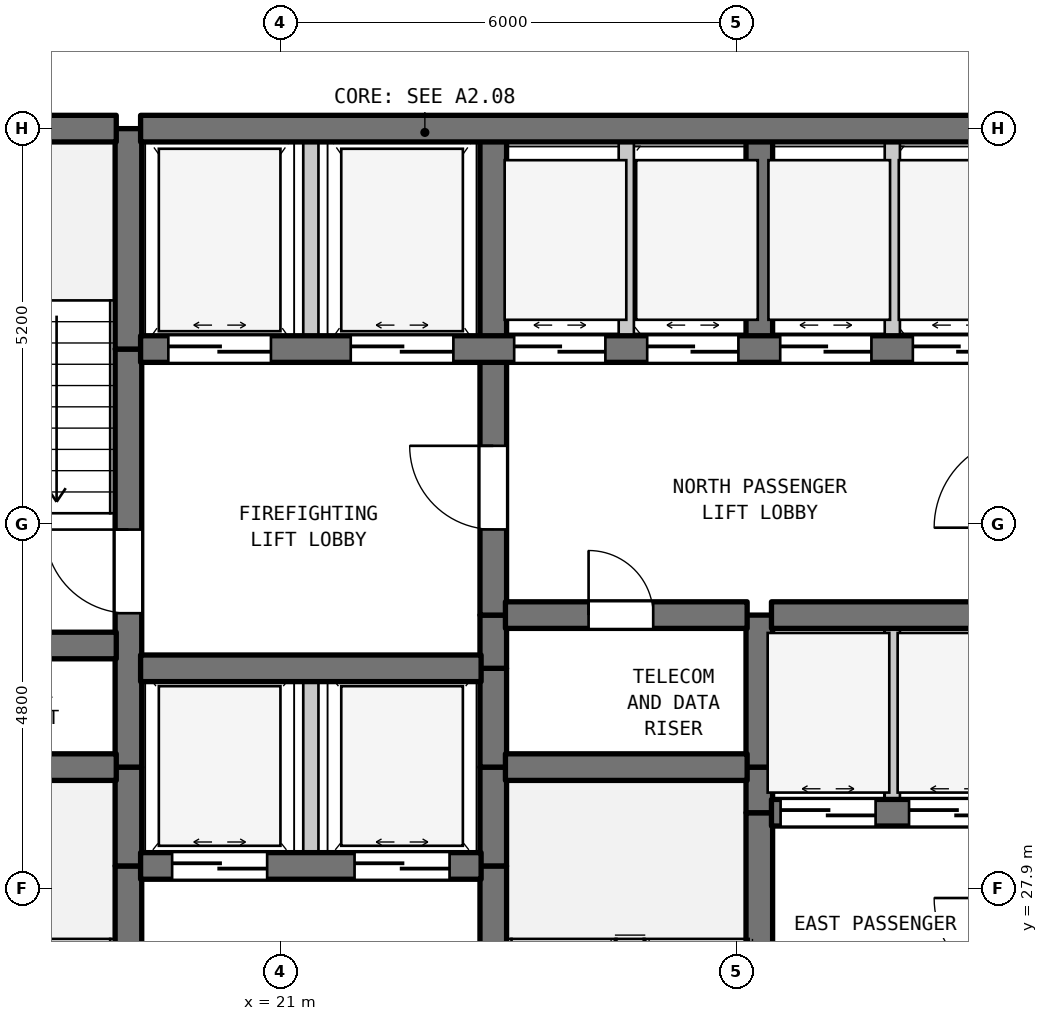
"""IFC4 building model, lengths in metres.
Left out: names, types, materials, properties, quantities, classifications, styles, units other than length and angle.
Written with IfcOpenShell. Run it as: python <this file> out.ifc"""

import sys

from ifc_helpers import new_model, si_unit, direction, frame, frame_2d, origin, place, context, subcontext, project, spatial, rectangle, extrude, element, fill, save


model = new_model("IFC4")
c1 = context("Model", 3, precision=1e-05, world=origin(), true_north=direction((0.0, 1.0)))
c2 = subcontext(c1, "Body", "Model", "MODEL_VIEW")
j1 = project(units=[si_unit("LENGTHUNIT", "METRE"), si_unit("PLANEANGLEUNIT", "RADIAN")], contexts=[c1])
p1 = place(None, origin())
s1 = spatial("IfcSite", under=j1, at=p1, CompositionType="ELEMENT")
p2 = place(p1, origin())
s2 = spatial("IfcBuilding", under=s1, at=p2, CompositionType="ELEMENT")
p3 = place(p2, frame((0.0, 0.0, 42.5)))
s3 = spatial("IfcBuildingStorey", under=s2, at=p3, CompositionType="ELEMENT", Elevation=42.5)
p4 = place(p3, frame((19.0, 22.7, 0.0), z_axis=(0.0, 0.0, 1.0), x_axis=(0.0, 1.0, 0.0)))
e1 = element("IfcWall", 1, at=p4, inside=s3, PredefinedType="SHEAR", context=c2, shape_type="SweptSolid", body=[
    extrude(rectangle(XDim=5.5, YDim=0.35, at=frame_2d((2.75, 0.0))), origin(), (0.0, 0.0, 1.0), 3.385),
])
p5 = place(p4, frame((0.631, 0.0, 0.0)))
e2 = element("IfcOpeningElement", 2, at=p5, cuts=e1, PredefinedType="OPENING", context=c2, shape_type="SweptSolid", body=[
    extrude(rectangle(XDim=1.1, YDim=2.15, at=frame_2d((0.55, 1.075))), frame((0.0, 0.185, 0.0), z_axis=(0.0, -1.0, 0.0), x_axis=(1.0, 0.0, 0.0)), (0.0, 0.0, 1.0), 0.37),
])
p6 = place(p3, frame((19.0, 28.2, 0.0), z_axis=(0.0, 0.0, 1.0), x_axis=(0.0, 1.0, 0.0)))
e3 = element("IfcWall", 3, at=p6, inside=s3, PredefinedType="SHEAR", context=c2, shape_type="SweptSolid", body=[
    extrude(rectangle(XDim=1.3, YDim=0.35, at=frame_2d((0.65, 0.0))), origin(), (0.0, 0.0, 1.0), 3.385),
])
p7 = place(p3, frame((19.0, 29.5, 0.0), z_axis=(0.0, 0.0, 1.0), x_axis=(0.0, 1.0, 0.0)))
e4 = element("IfcWall", 4, at=p7, inside=s3, PredefinedType="SHEAR", context=c2, shape_type="SweptSolid", body=[
    extrude(rectangle(XDim=5.5, YDim=0.35, at=frame_2d((2.75, 0.0))), origin(), (0.0, 0.0, 1.0), 3.385),
])
p8 = place(p7, frame((2.025, 0.0, 0.0)))
e5 = element("IfcOpeningElement", 5, at=p8, cuts=e4, PredefinedType="OPENING", context=c2, shape_type="SweptSolid", body=[
    extrude(rectangle(XDim=1.1, YDim=2.15, at=frame_2d((0.55, 1.075))), frame((0.0, 0.185, 0.0), z_axis=(0.0, -1.0, 0.0), x_axis=(1.0, 0.0, 0.0)), (0.0, 0.0, 1.0), 0.37),
])
p9 = place(p3, frame((19.0, 35.0, 0.0), z_axis=(0.0, 0.0, 1.0), x_axis=(0.0, 1.0, 0.0)))
e6 = element("IfcWall", 6, at=p9, inside=s3, PredefinedType="SHEAR", context=c2, shape_type="SweptSolid", body=[
    extrude(rectangle(XDim=2.9, YDim=0.35, at=frame_2d((1.45, 0.0))), origin(), (0.0, 0.0, 1.0), 3.385),
])
p10 = place(p3, frame((21.4, 28.2, 0.0), z_axis=(0.0, 0.0, 1.0), x_axis=(0.0, 1.0, 0.0)))
e7 = element("IfcWall", 7, at=p10, inside=s3, PredefinedType="STANDARD", context=c2, shape_type="SweptSolid", body=[
    extrude(rectangle(XDim=2.6, YDim=0.2, at=frame_2d((1.3, 0.0))), origin(), (0.0, 0.0, 1.0), 3.385),
])
p11 = place(p3, frame((21.4, 35.0, 0.0), z_axis=(0.0, 0.0, 1.0), x_axis=(0.0, 1.0, 0.0)))
e8 = element("IfcWall", 8, at=p11, inside=s3, PredefinedType="STANDARD", context=c2, shape_type="SweptSolid", body=[
    extrude(rectangle(XDim=2.9, YDim=0.2, at=frame_2d((1.45, 0.0))), origin(), (0.0, 0.0, 1.0), 3.385),
])
p12 = place(p3, frame((23.8, 22.7, 0.0), z_axis=(0.0, 0.0, 1.0), x_axis=(0.0, 1.0, 0.0)))
e9 = element("IfcWall", 9, at=p12, inside=s3, PredefinedType="SHEAR", context=c2, shape_type="SweptSolid", body=[
    extrude(rectangle(XDim=5.5, YDim=0.35, at=frame_2d((2.75, 0.0))), origin(), (0.0, 0.0, 1.0), 3.385),
])
p13 = place(p12, frame((0.235, 0.0, 0.0)))
e10 = element("IfcOpeningElement", 10, at=p13, cuts=e9, PredefinedType="OPENING", context=c2, shape_type="SweptSolid", body=[
    extrude(rectangle(XDim=1.1, YDim=2.15, at=frame_2d((0.55, 1.075))), frame((0.0, 0.185, 0.0), z_axis=(0.0, -1.0, 0.0), x_axis=(1.0, 0.0, 0.0)), (0.0, 0.0, 1.0), 0.37),
])
for number, where, z_axis, x_axis in (
    (11, (23.8, 28.2, 0.0), (0.0, 0.0, 1.0), (0.0, 1.0, 0.0)),
    (12, (23.8, 29.5, 0.0), (0.0, 0.0, 1.0), (0.0, 1.0, 0.0)),
):
    element("IfcWall", number, at=place(p3, frame(where, z_axis=z_axis, x_axis=x_axis)), inside=s3, PredefinedType="SHEAR", context=c2, shape_type="SweptSolid", body=[
        extrude(rectangle(XDim=1.3, YDim=0.35, at=frame_2d((0.65, 0.0))), origin(), (0.0, 0.0, 1.0), 3.385),
    ])
p14 = place(p3, frame((23.8, 30.8, 0.0), z_axis=(0.0, 0.0, 1.0), x_axis=(0.0, 1.0, 0.0)))
e13 = element("IfcWall", 13, at=p14, inside=s3, PredefinedType="SHEAR", context=c2, shape_type="SweptSolid", body=[
    extrude(rectangle(XDim=0.7, YDim=0.35, at=frame_2d((0.35, 0.0))), origin(), (0.0, 0.0, 1.0), 3.385),
])
p15 = place(p3, frame((23.8, 31.5, 0.0), z_axis=(0.0, 0.0, 1.0), x_axis=(0.0, 1.0, 0.0)))
e14 = element("IfcWall", 14, at=p15, inside=s3, PredefinedType="SHEAR", context=c2, shape_type="SweptSolid", body=[
    extrude(rectangle(XDim=3.5, YDim=0.35, at=frame_2d((1.75, 0.0))), origin(), (0.0, 0.0, 1.0), 3.385),
])
p16 = place(p15, frame((1.127, 0.0, 0.0)))
e15 = element("IfcOpeningElement", 15, at=p16, cuts=e14, PredefinedType="OPENING", context=c2, shape_type="SweptSolid", body=[
    extrude(rectangle(XDim=1.1, YDim=2.15, at=frame_2d((0.55, 1.075))), frame((0.0, 0.185, 0.0), z_axis=(0.0, -1.0, 0.0), x_axis=(1.0, 0.0, 0.0)), (0.0, 0.0, 1.0), 0.37),
])
p17 = place(p3, frame((23.8, 35.0, 0.0), z_axis=(0.0, 0.0, 1.0), x_axis=(0.0, 1.0, 0.0)))
e16 = element("IfcWall", 16, at=p17, inside=s3, PredefinedType="SHEAR", context=c2, shape_type="SweptSolid", body=[
    extrude(rectangle(XDim=2.9, YDim=0.35, at=frame_2d((1.45, 0.0))), origin(), (0.0, 0.0, 1.0), 3.385),
])
p18 = place(p3, frame((25.55, 35.0, 0.0), z_axis=(0.0, 0.0, 1.0), x_axis=(0.0, 1.0, 0.0)))
e17 = element("IfcWall", 17, at=p18, inside=s3, PredefinedType="STANDARD", context=c2, shape_type="SweptSolid", body=[
    extrude(rectangle(XDim=2.9, YDim=0.2, at=frame_2d((1.45, 0.0))), origin(), (0.0, 0.0, 1.0), 3.385),
])
p19 = place(p3, frame((27.3, 25.6, 0.0), z_axis=(0.0, 0.0, 1.0), x_axis=(0.0, 1.0, 0.0)))
e18 = element("IfcWall", 18, at=p19, inside=s3, PredefinedType="SHEAR", context=c2, shape_type="SweptSolid", body=[
    extrude(rectangle(XDim=3.3, YDim=0.35, at=frame_2d((1.65, 0.0))), origin(), (0.0, 0.0, 1.0), 3.385),
])
p20 = place(p3, frame((27.3, 28.9, 0.0), z_axis=(0.0, 0.0, 1.0), x_axis=(0.0, 1.0, 0.0)))
e19 = element("IfcWall", 19, at=p20, inside=s3, PredefinedType="SHEAR", context=c2, shape_type="SweptSolid", body=[
    extrude(rectangle(XDim=0.6, YDim=0.35, at=frame_2d((0.3, 0.0))), origin(), (0.0, 0.0, 1.0), 3.385),
])
p21 = place(p3, frame((27.3, 29.5, 0.0), z_axis=(0.0, 0.0, 1.0), x_axis=(0.0, 1.0, 0.0)))
e20 = element("IfcWall", 20, at=p21, inside=s3, PredefinedType="SHEAR", context=c2, shape_type="SweptSolid", body=[
    extrude(rectangle(XDim=2.0, YDim=0.35, at=frame_2d((1.0, 0.0))), origin(), (0.0, 0.0, 1.0), 3.385),
])
p22 = place(p3, frame((27.3, 35.0, 0.0), z_axis=(0.0, 0.0, 1.0), x_axis=(0.0, 1.0, 0.0)))
e21 = element("IfcWall", 21, at=p22, inside=s3, PredefinedType="SHEAR", context=c2, shape_type="SweptSolid", body=[
    extrude(rectangle(XDim=2.9, YDim=0.35, at=frame_2d((1.45, 0.0))), origin(), (0.0, 0.0, 1.0), 3.385),
])
p23 = place(p3, frame((29.05, 28.9, 0.0), z_axis=(0.0, 0.0, 1.0), x_axis=(0.0, 1.0, 0.0)))
e22 = element("IfcWall", 22, at=p23, inside=s3, PredefinedType="STANDARD", context=c2, shape_type="SweptSolid", body=[
    extrude(rectangle(XDim=2.6, YDim=0.2, at=frame_2d((1.3, 0.0))), origin(), (0.0, 0.0, 1.0), 3.385),
])
p24 = place(p3, frame((29.05, 35.0, 0.0), z_axis=(0.0, 0.0, 1.0), x_axis=(0.0, 1.0, 0.0)))
e23 = element("IfcWall", 23, at=p24, inside=s3, PredefinedType="STANDARD", context=c2, shape_type="SweptSolid", body=[
    extrude(rectangle(XDim=2.9, YDim=0.2, at=frame_2d((1.45, 0.0))), origin(), (0.0, 0.0, 1.0), 3.385),
])
p25 = place(p3, frame((19.16, 28.2, 0.0), z_axis=(0.0, 0.0, 1.0), x_axis=(1.0, 0.0, 0.0)))
e24 = element("IfcWall", 24, at=p25, inside=s3, PredefinedType="SHEAR", context=c2, shape_type="SweptSolid", body=[
    extrude(rectangle(XDim=4.48, YDim=0.35, at=frame_2d((2.24, 0.0))), origin(), (0.0, 0.0, 1.0), 3.385),
])
p26 = place(p25, frame((0.415, 0.0, 0.0)))
e25 = element("IfcOpeningElement", 25, at=p26, cuts=e24, PredefinedType="OPENING", context=c2, shape_type="SweptSolid", body=[
    extrude(rectangle(XDim=1.25, YDim=2.2, at=frame_2d((0.625, 1.1))), frame((0.0, 0.185, 0.0), z_axis=(0.0, -1.0, 0.0), x_axis=(1.0, 0.0, 0.0)), (0.0, 0.0, 1.0), 0.37),
])
p27 = place(p25, frame((2.815, 0.0, 0.0)))
e26 = element("IfcOpeningElement", 26, at=p27, cuts=e24, PredefinedType="OPENING", context=c2, shape_type="SweptSolid", body=[
    extrude(rectangle(XDim=1.25, YDim=2.2, at=frame_2d((0.625, 1.1))), frame((0.0, 0.185, 0.0), z_axis=(0.0, -1.0, 0.0), x_axis=(1.0, 0.0, 0.0)), (0.0, 0.0, 1.0), 0.37),
])
p28 = place(p3, frame((27.46, 28.9, 0.0), z_axis=(0.0, 0.0, 1.0), x_axis=(1.0, 0.0, 0.0)))
e27 = element("IfcWall", 27, at=p28, inside=s3, PredefinedType="SHEAR", context=c2, shape_type="SweptSolid", body=[
    extrude(rectangle(XDim=3.18, YDim=0.35, at=frame_2d((1.59, 0.0))), origin(), (0.0, 0.0, 1.0), 3.385),
])
p29 = place(p28, frame((0.12, 0.0, 0.0)))
e28 = element("IfcOpeningElement", 28, at=p29, cuts=e27, PredefinedType="OPENING", context=c2, shape_type="SweptSolid", body=[
    extrude(rectangle(XDim=1.25, YDim=2.2, at=frame_2d((0.625, 1.1))), frame((0.0, 0.185, 0.0), z_axis=(0.0, -1.0, 0.0), x_axis=(1.0, 0.0, 0.0)), (0.0, 0.0, 1.0), 0.37),
])
p30 = place(p28, frame((1.81, 0.0, 0.0)))
e29 = element("IfcOpeningElement", 29, at=p30, cuts=e27, PredefinedType="OPENING", context=c2, shape_type="SweptSolid", body=[
    extrude(rectangle(XDim=1.25, YDim=2.2, at=frame_2d((0.625, 1.1))), frame((0.0, 0.185, 0.0), z_axis=(0.0, -1.0, 0.0), x_axis=(1.0, 0.0, 0.0)), (0.0, 0.0, 1.0), 0.37),
])
p31 = place(p3, frame((15.16, 29.5, 0.0), z_axis=(0.0, 0.0, 1.0), x_axis=(1.0, 0.0, 0.0)))
e30 = element("IfcWall", 30, at=p31, inside=s3, PredefinedType="SHEAR", context=c2, shape_type="SweptSolid", body=[
    extrude(rectangle(XDim=3.68, YDim=0.35, at=frame_2d((1.84, 0.0))), origin(), (0.0, 0.0, 1.0), 3.385),
])
p32 = place(p3, frame((23.96, 29.5, 0.0), z_axis=(0.0, 0.0, 1.0), x_axis=(1.0, 0.0, 0.0)))
e31 = element("IfcWall", 31, at=p32, inside=s3, PredefinedType="SHEAR", context=c2, shape_type="SweptSolid", body=[
    extrude(rectangle(XDim=3.18, YDim=0.35, at=frame_2d((1.59, 0.0))), origin(), (0.0, 0.0, 1.0), 3.385),
])
p33 = place(p3, frame((19.16, 30.8, 0.0), z_axis=(0.0, 0.0, 1.0), x_axis=(1.0, 0.0, 0.0)))
e32 = element("IfcWall", 32, at=p33, inside=s3, PredefinedType="SHEAR", context=c2, shape_type="SweptSolid", body=[
    extrude(rectangle(XDim=4.48, YDim=0.35, at=frame_2d((2.24, 0.0))), origin(), (0.0, 0.0, 1.0), 3.385),
])
p34 = place(p3, frame((15.16, 31.1, 0.0), z_axis=(0.0, 0.0, 1.0), x_axis=(1.0, 0.0, 0.0)))
e33 = element("IfcWall", 33, at=p34, inside=s3, PredefinedType="SHEAR", context=c2, shape_type="SweptSolid", body=[
    extrude(rectangle(XDim=3.68, YDim=0.35, at=frame_2d((1.84, 0.0))), origin(), (0.0, 0.0, 1.0), 3.385),
])
p35 = place(p3, frame((23.96, 31.5, 0.0), z_axis=(0.0, 0.0, 1.0), x_axis=(1.0, 0.0, 0.0)))
e34 = element("IfcWall", 34, at=p35, inside=s3, PredefinedType="SHEAR", context=c2, shape_type="SweptSolid", body=[
    extrude(rectangle(XDim=3.18, YDim=0.35, at=frame_2d((1.59, 0.0))), origin(), (0.0, 0.0, 1.0), 3.385),
])
p36 = place(p35, frame((1.094, 0.0, 0.0)))
e35 = element("IfcOpeningElement", 35, at=p36, cuts=e34, PredefinedType="OPENING", context=c2, shape_type="SweptSolid", body=[
    extrude(rectangle(XDim=0.85, YDim=2.1, at=frame_2d((0.425, 1.05))), frame((0.0, 0.185, 0.0), z_axis=(0.0, -1.0, 0.0), x_axis=(1.0, 0.0, 0.0)), (0.0, 0.0, 1.0), 0.37),
])
p37 = place(p3, frame((27.46, 31.5, 0.0), z_axis=(0.0, 0.0, 1.0), x_axis=(1.0, 0.0, 0.0)))
e36 = element("IfcWall", 36, at=p37, inside=s3, PredefinedType="SHEAR", context=c2, shape_type="SweptSolid", body=[
    extrude(rectangle(XDim=3.18, YDim=0.35, at=frame_2d((1.59, 0.0))), origin(), (0.0, 0.0, 1.0), 3.385),
])
p38 = place(p3, frame((19.16, 35.0, 0.0), z_axis=(0.0, 0.0, 1.0), x_axis=(1.0, 0.0, 0.0)))
e37 = element("IfcWall", 37, at=p38, inside=s3, PredefinedType="SHEAR", context=c2, shape_type="SweptSolid", body=[
    extrude(rectangle(XDim=11.48, YDim=0.35, at=frame_2d((5.74, 0.0))), origin(), (0.0, 0.0, 1.0), 3.385),
])
p39 = place(p38, frame((0.365, 0.0, 0.0)))
e38 = element("IfcOpeningElement", 38, at=p39, cuts=e37, PredefinedType="OPENING", context=c2, shape_type="SweptSolid", body=[
    extrude(rectangle(XDim=1.35, YDim=2.2, at=frame_2d((0.675, 1.1))), frame((0.0, 0.185, 0.0), z_axis=(0.0, -1.0, 0.0), x_axis=(1.0, 0.0, 0.0)), (0.0, 0.0, 1.0), 0.37),
])
p40 = place(p38, frame((2.765, 0.0, 0.0)))
e39 = element("IfcOpeningElement", 39, at=p40, cuts=e37, PredefinedType="OPENING", context=c2, shape_type="SweptSolid", body=[
    extrude(rectangle(XDim=1.35, YDim=2.2, at=frame_2d((0.675, 1.1))), frame((0.0, 0.185, 0.0), z_axis=(0.0, -1.0, 0.0), x_axis=(1.0, 0.0, 0.0)), (0.0, 0.0, 1.0), 0.37),
])
p41 = place(p38, frame((4.915, 0.0, 0.0)))
e40 = element("IfcOpeningElement", 40, at=p41, cuts=e37, PredefinedType="OPENING", context=c2, shape_type="SweptSolid", body=[
    extrude(rectangle(XDim=1.2, YDim=2.2, at=frame_2d((0.6, 1.1))), frame((0.0, 0.185, 0.0), z_axis=(0.0, -1.0, 0.0), x_axis=(1.0, 0.0, 0.0)), (0.0, 0.0, 1.0), 0.37),
])
p42 = place(p38, frame((6.665, 0.0, 0.0)))
e41 = element("IfcOpeningElement", 41, at=p42, cuts=e37, PredefinedType="OPENING", context=c2, shape_type="SweptSolid", body=[
    extrude(rectangle(XDim=1.2, YDim=2.2, at=frame_2d((0.6, 1.1))), frame((0.0, 0.185, 0.0), z_axis=(0.0, -1.0, 0.0), x_axis=(1.0, 0.0, 0.0)), (0.0, 0.0, 1.0), 0.37),
])
p43 = place(p38, frame((8.415, 0.0, 0.0)))
e42 = element("IfcOpeningElement", 42, at=p43, cuts=e37, PredefinedType="OPENING", context=c2, shape_type="SweptSolid", body=[
    extrude(rectangle(XDim=1.2, YDim=2.2, at=frame_2d((0.6, 1.1))), frame((0.0, 0.185, 0.0), z_axis=(0.0, -1.0, 0.0), x_axis=(1.0, 0.0, 0.0)), (0.0, 0.0, 1.0), 0.37),
])
p44 = place(p38, frame((10.16, 0.0, 0.0)))
e43 = element("IfcOpeningElement", 43, at=p44, cuts=e37, PredefinedType="OPENING", context=c2, shape_type="SweptSolid", body=[
    extrude(rectangle(XDim=1.2, YDim=2.2, at=frame_2d((0.6, 1.1))), frame((0.0, 0.185, 0.0), z_axis=(0.0, -1.0, 0.0), x_axis=(1.0, 0.0, 0.0)), (0.0, 0.0, 1.0), 0.37),
])
p45 = place(p3, frame((15.16, 37.9, 0.0), z_axis=(0.0, 0.0, 1.0), x_axis=(1.0, 0.0, 0.0)))
e44 = element("IfcWall", 44, at=p45, inside=s3, PredefinedType="SHEAR", context=c2, shape_type="SweptSolid", body=[
    extrude(rectangle(XDim=3.68, YDim=0.35, at=frame_2d((1.84, 0.0))), origin(), (0.0, 0.0, 1.0), 3.385),
])
p46 = place(p3, frame((19.16, 37.9, 0.0), z_axis=(0.0, 0.0, 1.0), x_axis=(1.0, 0.0, 0.0)))
e45 = element("IfcWall", 45, at=p46, inside=s3, PredefinedType="SHEAR", context=c2, shape_type="SweptSolid", body=[
    extrude(rectangle(XDim=11.48, YDim=0.35, at=frame_2d((5.74, 0.0))), origin(), (0.0, 0.0, 1.0), 3.385),
])
p47 = place(p8, origin())
e46 = element("IfcDoor", 46, at=p47, inside=s3, OperationType="SINGLE_SWING_RIGHT", PredefinedType="DOOR", context=c2, shape_type="SweptSolid", body=[
    extrude(rectangle(XDim=1.1, YDim=2.15, at=frame_2d((0.55, 1.075))), frame((0.0, 0.025, 0.0), z_axis=(0.0, -1.0, 0.0), x_axis=(1.0, 0.0, 0.0)), (0.0, 0.0, 1.0), 0.05),
])
fill(e5, e46)
p48 = place(p16, origin())
e47 = element("IfcDoor", 47, at=p48, inside=s3, OperationType="SINGLE_SWING_RIGHT", PredefinedType="DOOR", context=c2, shape_type="SweptSolid", body=[
    extrude(rectangle(XDim=1.1, YDim=2.15, at=frame_2d((0.55, 1.075))), frame((0.0, 0.025, 0.0), z_axis=(0.0, -1.0, 0.0), x_axis=(1.0, 0.0, 0.0)), (0.0, 0.0, 1.0), 0.05),
])
fill(e15, e47)
p49 = place(p26, origin())
e48 = element("IfcDoor", 48, at=p49, inside=s3, OperationType="DOUBLE_DOOR_SLIDING", PredefinedType="DOOR", context=c2, shape_type="SweptSolid", body=[
    extrude(rectangle(XDim=1.25, YDim=2.2, at=frame_2d((0.625, 1.1))), frame((0.0, 0.025, 0.0), z_axis=(0.0, -1.0, 0.0), x_axis=(1.0, 0.0, 0.0)), (0.0, 0.0, 1.0), 0.05),
])
fill(e25, e48)
p50 = place(p27, origin())
e49 = element("IfcDoor", 49, at=p50, inside=s3, OperationType="DOUBLE_DOOR_SLIDING", PredefinedType="DOOR", context=c2, shape_type="SweptSolid", body=[
    extrude(rectangle(XDim=1.25, YDim=2.2, at=frame_2d((0.625, 1.1))), frame((0.0, 0.025, 0.0), z_axis=(0.0, -1.0, 0.0), x_axis=(1.0, 0.0, 0.0)), (0.0, 0.0, 1.0), 0.05),
])
fill(e26, e49)
p51 = place(p29, origin())
e50 = element("IfcDoor", 50, at=p51, inside=s3, OperationType="DOUBLE_DOOR_SLIDING", PredefinedType="DOOR", context=c2, shape_type="SweptSolid", body=[
    extrude(rectangle(XDim=1.25, YDim=2.2, at=frame_2d((0.625, 1.1))), frame((0.0, 0.025, 0.0), z_axis=(0.0, -1.0, 0.0), x_axis=(1.0, 0.0, 0.0)), (0.0, 0.0, 1.0), 0.05),
])
fill(e28, e50)
p52 = place(p30, origin())
e51 = element("IfcDoor", 51, at=p52, inside=s3, OperationType="DOUBLE_DOOR_SLIDING", PredefinedType="DOOR", context=c2, shape_type="SweptSolid", body=[
    extrude(rectangle(XDim=1.25, YDim=2.2, at=frame_2d((0.625, 1.1))), frame((0.0, 0.025, 0.0), z_axis=(0.0, -1.0, 0.0), x_axis=(1.0, 0.0, 0.0)), (0.0, 0.0, 1.0), 0.05),
])
fill(e29, e51)
p53 = place(p36, origin())
e52 = element("IfcDoor", 52, at=p53, inside=s3, OperationType="SINGLE_SWING_LEFT", PredefinedType="DOOR", context=c2, shape_type="SweptSolid", body=[
    extrude(rectangle(XDim=0.85, YDim=2.1, at=frame_2d((0.425, 1.05))), frame((0.0, 0.025, 0.0), z_axis=(0.0, -1.0, 0.0), x_axis=(1.0, 0.0, 0.0)), (0.0, 0.0, 1.0), 0.05),
])
fill(e35, e52)
p54 = place(p39, origin())
e53 = element("IfcDoor", 53, at=p54, inside=s3, OperationType="DOUBLE_DOOR_SLIDING", PredefinedType="DOOR", context=c2, shape_type="SweptSolid", body=[
    extrude(rectangle(XDim=1.35, YDim=2.2, at=frame_2d((0.675, 1.1))), frame((0.0, 0.025, 0.0), z_axis=(0.0, -1.0, 0.0), x_axis=(1.0, 0.0, 0.0)), (0.0, 0.0, 1.0), 0.05),
])
fill(e38, e53)
p55 = place(p40, origin())
e54 = element("IfcDoor", 54, at=p55, inside=s3, OperationType="DOUBLE_DOOR_SLIDING", PredefinedType="DOOR", context=c2, shape_type="SweptSolid", body=[
    extrude(rectangle(XDim=1.35, YDim=2.2, at=frame_2d((0.675, 1.1))), frame((0.0, 0.025, 0.0), z_axis=(0.0, -1.0, 0.0), x_axis=(1.0, 0.0, 0.0)), (0.0, 0.0, 1.0), 0.05),
])
fill(e39, e54)
p56 = place(p41, origin())
e55 = element("IfcDoor", 55, at=p56, inside=s3, OperationType="DOUBLE_DOOR_SLIDING", PredefinedType="DOOR", context=c2, shape_type="SweptSolid", body=[
    extrude(rectangle(XDim=1.2, YDim=2.2, at=frame_2d((0.6, 1.1))), frame((0.0, 0.025, 0.0), z_axis=(0.0, -1.0, 0.0), x_axis=(1.0, 0.0, 0.0)), (0.0, 0.0, 1.0), 0.05),
])
fill(e40, e55)
p57 = place(p42, origin())
e56 = element("IfcDoor", 56, at=p57, inside=s3, OperationType="DOUBLE_DOOR_SLIDING", PredefinedType="DOOR", context=c2, shape_type="SweptSolid", body=[
    extrude(rectangle(XDim=1.2, YDim=2.2, at=frame_2d((0.6, 1.1))), frame((0.0, 0.025, 0.0), z_axis=(0.0, -1.0, 0.0), x_axis=(1.0, 0.0, 0.0)), (0.0, 0.0, 1.0), 0.05),
])
fill(e41, e56)
p58 = place(p43, origin())
e57 = element("IfcDoor", 57, at=p58, inside=s3, OperationType="DOUBLE_DOOR_SLIDING", PredefinedType="DOOR", context=c2, shape_type="SweptSolid", body=[
    extrude(rectangle(XDim=1.2, YDim=2.2, at=frame_2d((0.6, 1.1))), frame((0.0, 0.025, 0.0), z_axis=(0.0, -1.0, 0.0), x_axis=(1.0, 0.0, 0.0)), (0.0, 0.0, 1.0), 0.05),
])
fill(e42, e57)
p59 = place(p44, origin())
e58 = element("IfcDoor", 58, at=p59, inside=s3, OperationType="DOUBLE_DOOR_SLIDING", PredefinedType="DOOR", context=c2, shape_type="SweptSolid", body=[
    extrude(rectangle(XDim=1.2, YDim=2.2, at=frame_2d((0.6, 1.1))), frame((0.0, 0.025, 0.0), z_axis=(0.0, -1.0, 0.0), x_axis=(1.0, 0.0, 0.0)), (0.0, 0.0, 1.0), 0.05),
])
fill(e43, e58)
save(model, sys.argv[1])
